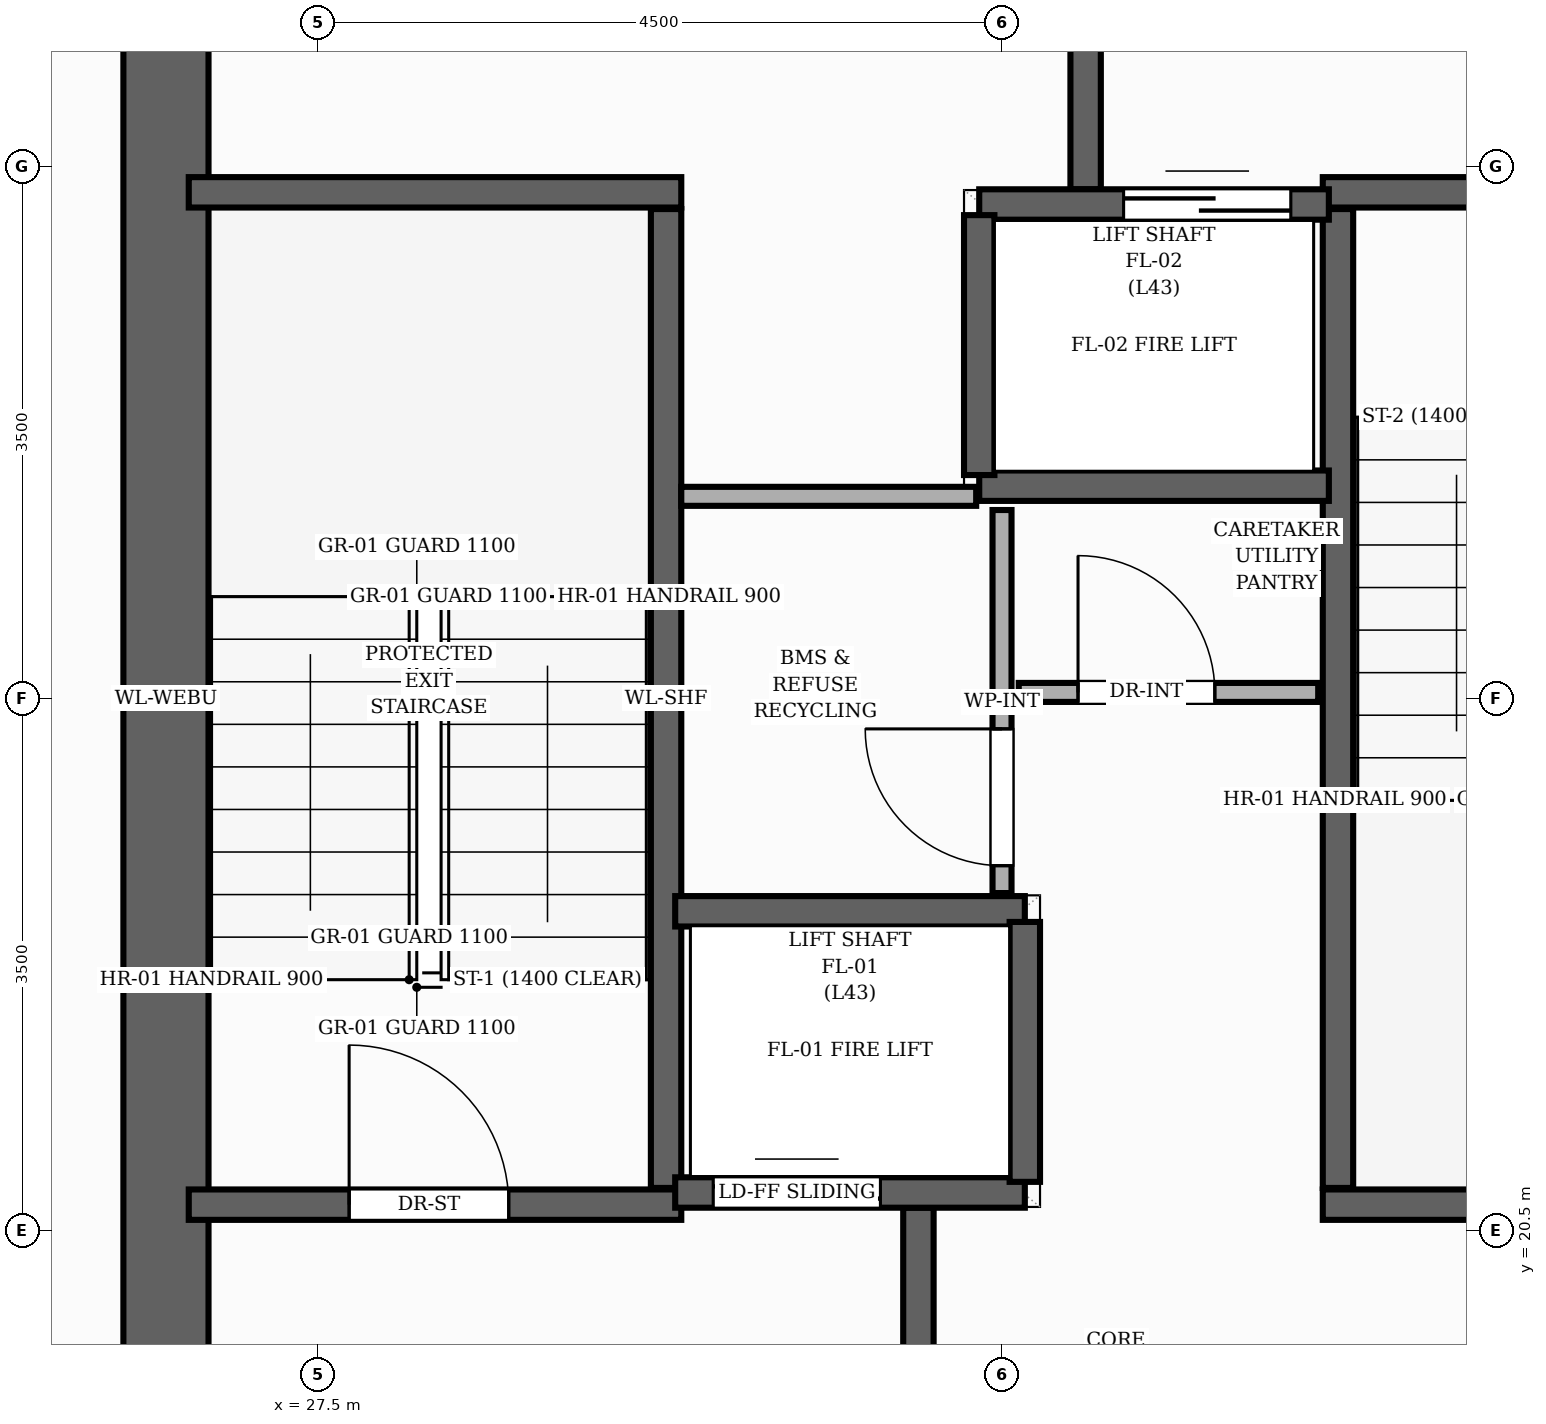
"""IFC4 building model, lengths in metres.
Left out: names, types, materials, properties, quantities, classifications, styles, units other than length and angle.
Written with IfcOpenShell. Run it as: python <this file> out.ifc"""

import sys

from ifc_helpers import new_model, si_unit, direction, frame, frame_2d, origin, place, context, subcontext, project, spatial, rectangle, extrude, element, fill, save


model = new_model("IFC4")
c1 = context("Model", 3, precision=1e-05, world=origin(), true_north=direction((0.0, 1.0)))
c2 = subcontext(c1, "Body", "Model", "MODEL_VIEW")
j1 = project(units=[si_unit("LENGTHUNIT", "METRE"), si_unit("PLANEANGLEUNIT", "RADIAN")], contexts=[c1])
p1 = place(None, origin())
s1 = spatial("IfcSite", under=j1, at=p1, CompositionType="ELEMENT")
p2 = place(p1, origin())
s2 = spatial("IfcBuilding", under=s1, at=p2, CompositionType="ELEMENT")
p3 = place(p2, frame((0.0, 0.0, 142.56)))
s3 = spatial("IfcBuildingStorey", under=s2, at=p3, CompositionType="ELEMENT", Elevation=142.56)
p4 = place(p3, frame((26.5, 17.3, 0.0), z_axis=(0.0, 0.0, 1.0), x_axis=(0.0, 1.0, 0.0)))
e1 = element("IfcWall", 1, at=p4, inside=s3, PredefinedType="SHEAR", context=c2, shape_type="SweptSolid", body=[
    extrude(rectangle(XDim=13.4, YDim=0.56, at=frame_2d((6.7, 0.0))), origin(), (0.0, 0.0, 1.0), 3.2),
])
p5 = place(p3, frame((29.79, 20.78, 0.0), z_axis=(0.0, 0.0, 1.0), x_axis=(0.0, 1.0, 0.0)))
e2 = element("IfcWall", 2, at=p5, inside=s3, PredefinedType="SHEAR", context=c2, shape_type="SweptSolid", body=[
    extrude(rectangle(XDim=6.44, YDim=0.2, at=frame_2d((3.22, 0.0))), origin(), (0.0, 0.0, 1.0), 3.2),
])
p6 = place(p3, frame((26.65, 27.33, 0.0), z_axis=(0.0, 0.0, 1.0), x_axis=(1.0, 0.0, 0.0)))
e3 = element("IfcWall", 3, at=p6, inside=s3, PredefinedType="SHEAR", context=c2, shape_type="SweptSolid", body=[
    extrude(rectangle(XDim=3.24, YDim=0.2, at=frame_2d((1.62, 0.0))), origin(), (0.0, 0.0, 1.0), 3.2),
])
p7 = place(p3, frame((26.65, 20.67, 0.0), z_axis=(0.0, 0.0, 1.0), x_axis=(1.0, 0.0, 0.0)))
e4 = element("IfcWall", 4, at=p7, inside=s3, PredefinedType="SHEAR", context=c2, shape_type="SweptSolid", body=[
    extrude(rectangle(XDim=3.24, YDim=0.2, at=frame_2d((1.62, 0.0))), origin(), (0.0, 0.0, 1.0), 3.2),
])
p8 = place(p7, frame((1.055, 0.0, 0.0)))
e5 = element("IfcOpeningElement", 5, at=p8, cuts=e4, PredefinedType="OPENING", context=c2, shape_type="SweptSolid", body=[
    extrude(rectangle(XDim=1.05, YDim=2.15, at=frame_2d((0.525, 1.075))), frame((0.0, 0.11, 0.0), z_axis=(0.0, -1.0, 0.0), x_axis=(1.0, 0.0, 0.0)), (0.0, 0.0, 1.0), 0.22),
])
p9 = place(p3, frame((34.21, 20.78, 0.0), z_axis=(0.0, 0.0, 1.0), x_axis=(0.0, 1.0, 0.0)))
e6 = element("IfcWall", 6, at=p9, inside=s3, PredefinedType="SHEAR", context=c2, shape_type="SweptSolid", body=[
    extrude(rectangle(XDim=6.44, YDim=0.2, at=frame_2d((3.22, 0.0))), origin(), (0.0, 0.0, 1.0), 3.2),
])
p10 = place(p3, frame((34.11, 20.67, 0.0), z_axis=(0.0, 0.0, 1.0), x_axis=(1.0, 0.0, 0.0)))
e7 = element("IfcWall", 7, at=p10, inside=s3, PredefinedType="SHEAR", context=c2, shape_type="SweptSolid", body=[
    extrude(rectangle(XDim=3.24, YDim=0.2, at=frame_2d((1.62, 0.0))), origin(), (0.0, 0.0, 1.0), 3.2),
])
p11 = place(p3, frame((34.11, 27.33, 0.0), z_axis=(0.0, 0.0, 1.0), x_axis=(1.0, 0.0, 0.0)))
e8 = element("IfcWall", 8, at=p11, inside=s3, PredefinedType="SHEAR", context=c2, shape_type="SweptSolid", body=[
    extrude(rectangle(XDim=3.24, YDim=0.2, at=frame_2d((1.62, 0.0))), origin(), (0.0, 0.0, 1.0), 3.2),
])
p12 = place(p11, frame((1.135, 0.0, 0.0)))
e9 = element("IfcOpeningElement", 9, at=p12, cuts=e8, PredefinedType="OPENING", context=c2, shape_type="SweptSolid", body=[
    extrude(rectangle(XDim=1.05, YDim=2.15, at=frame_2d((0.525, 1.075))), frame((0.0, 0.11, 0.0), z_axis=(0.0, -1.0, 0.0), x_axis=(1.0, 0.0, 0.0)), (0.0, 0.0, 1.0), 0.22),
])
for number, where, z_axis, x_axis in (
    (10, (31.45, 17.15, 0.0), (0.0, 0.0, 1.0), (0.0, 1.0, 0.0)),
    (11, (32.55, 27.35, 0.0), (0.0, 0.0, 1.0), (0.0, 1.0, 0.0)),
):
    element("IfcWall", number, at=place(p3, frame(where, z_axis=z_axis, x_axis=x_axis)), inside=s3, PredefinedType="SHEAR", context=c2, shape_type="SweptSolid", body=[
        extrude(rectangle(XDim=3.5, YDim=0.2, at=frame_2d((1.75, 0.0))), origin(), (0.0, 0.0, 1.0), 3.2),
    ])
p13 = place(p3, frame((29.85, 20.75, 0.0), z_axis=(0.0, 0.0, 1.0), x_axis=(1.0, 0.0, 0.0)))
e12 = element("IfcWall", 12, at=p13, inside=s3, PredefinedType="SHEAR", context=c2, shape_type="SweptSolid", body=[
    extrude(rectangle(XDim=2.3, YDim=0.2, at=frame_2d((1.15, 0.0))), origin(), (0.0, 0.0, 1.0), 3.2),
])
p14 = place(p13, frame((0.25, 0.0, 0.0)))
e13 = element("IfcOpeningElement", 13, at=p14, cuts=e12, PredefinedType="OPENING", context=c2, shape_type="SweptSolid", body=[
    extrude(rectangle(XDim=1.1, YDim=2.15, at=frame_2d((0.55, 1.075))), frame((0.0, 0.11, 0.0), z_axis=(0.0, -1.0, 0.0), x_axis=(1.0, 0.0, 0.0)), (0.0, 0.0, 1.0), 0.22),
])
p15 = place(p3, frame((29.85, 22.6, 0.0), z_axis=(0.0, 0.0, 1.0), x_axis=(1.0, 0.0, 0.0)))
e14 = element("IfcWall", 14, at=p15, inside=s3, PredefinedType="SHEAR", context=c2, shape_type="SweptSolid", body=[
    extrude(rectangle(XDim=2.3, YDim=0.2, at=frame_2d((1.15, 0.0))), origin(), (0.0, 0.0, 1.0), 3.2),
])
p16 = place(p3, frame((32.15, 20.82, 0.0), z_axis=(0.0, 0.0, 1.0), x_axis=(0.0, 1.0, 0.0)))
e15 = element("IfcWall", 15, at=p16, inside=s3, PredefinedType="SHEAR", context=c2, shape_type="SweptSolid", body=[
    extrude(rectangle(XDim=1.71, YDim=0.2, at=frame_2d((0.855, 0.0))), origin(), (0.0, 0.0, 1.0), 3.2),
])
p17 = place(p3, frame((31.85, 27.25, 0.0), z_axis=(0.0, 0.0, 1.0), x_axis=(1.0, 0.0, 0.0)))
e16 = element("IfcWall", 16, at=p17, inside=s3, PredefinedType="SHEAR", context=c2, shape_type="SweptSolid", body=[
    extrude(rectangle(XDim=2.3, YDim=0.2, at=frame_2d((1.15, 0.0))), origin(), (0.0, 0.0, 1.0), 3.2),
])
p18 = place(p17, frame((0.95, 0.0, 0.0)))
e17 = element("IfcOpeningElement", 17, at=p18, cuts=e16, PredefinedType="OPENING", context=c2, shape_type="SweptSolid", body=[
    extrude(rectangle(XDim=1.1, YDim=2.15, at=frame_2d((0.55, 1.075))), frame((0.0, 0.11, 0.0), z_axis=(0.0, -1.0, 0.0), x_axis=(1.0, 0.0, 0.0)), (0.0, 0.0, 1.0), 0.22),
])
p19 = place(p3, frame((31.85, 25.4, 0.0), z_axis=(0.0, 0.0, 1.0), x_axis=(1.0, 0.0, 0.0)))
e18 = element("IfcWall", 18, at=p19, inside=s3, PredefinedType="SHEAR", context=c2, shape_type="SweptSolid", body=[
    extrude(rectangle(XDim=2.3, YDim=0.2, at=frame_2d((1.15, 0.0))), origin(), (0.0, 0.0, 1.0), 3.2),
])
p20 = place(p3, frame((31.85, 25.47, 0.0), z_axis=(0.0, 0.0, 1.0), x_axis=(0.0, 1.0, 0.0)))
e19 = element("IfcWall", 19, at=p20, inside=s3, PredefinedType="SHEAR", context=c2, shape_type="SweptSolid", body=[
    extrude(rectangle(XDim=1.71, YDim=0.2, at=frame_2d((0.855, 0.0))), origin(), (0.0, 0.0, 1.0), 3.2),
])
p21 = place(p3, frame((32.0, 22.72, 0.0), z_axis=(0.0, 0.0, 1.0), x_axis=(0.0, 1.0, 0.0)))
e20 = element("IfcWall", 20, at=p21, inside=s3, PredefinedType="PARTITIONING", context=c2, shape_type="SweptSolid", body=[
    extrude(rectangle(XDim=2.52, YDim=0.125, at=frame_2d((1.26, 0.0))), origin(), (0.0, 0.0, 1.0), 2.955),
])
p22 = place(p21, frame((0.18, 0.0, 0.0)))
e21 = element("IfcOpeningElement", 21, at=p22, cuts=e20, PredefinedType="OPENING", context=c2, shape_type="SweptSolid", body=[
    extrude(rectangle(XDim=0.9, YDim=2.1, at=frame_2d((0.45, 1.05))), frame((0.0, 0.073, 0.0), z_axis=(0.0, -1.0, 0.0), x_axis=(1.0, 0.0, 0.0)), (0.0, 0.0, 1.0), 0.145),
])
p23 = place(p3, frame((32.11, 24.04, 0.0), z_axis=(0.0, 0.0, 1.0), x_axis=(1.0, 0.0, 0.0)))
e22 = element("IfcWall", 22, at=p23, inside=s3, PredefinedType="PARTITIONING", context=c2, shape_type="SweptSolid", body=[
    extrude(rectangle(XDim=1.97, YDim=0.125, at=frame_2d((0.985, 0.0))), origin(), (0.0, 0.0, 1.0), 2.955),
])
p24 = place(p23, frame((0.39, 0.0, 0.0)))
e23 = element("IfcOpeningElement", 23, at=p24, cuts=e22, PredefinedType="OPENING", context=c2, shape_type="SweptSolid", body=[
    extrude(rectangle(XDim=0.9, YDim=2.1, at=frame_2d((0.45, 1.05))), frame((0.0, 0.073, 0.0), z_axis=(0.0, -1.0, 0.0), x_axis=(1.0, 0.0, 0.0)), (0.0, 0.0, 1.0), 0.145),
])
p25 = place(p3, frame((29.89, 25.33, 0.0), z_axis=(0.0, 0.0, 1.0), x_axis=(1.0, 0.0, 0.0)))
e24 = element("IfcWall", 24, at=p25, inside=s3, PredefinedType="PARTITIONING", context=c2, shape_type="SweptSolid", body=[
    extrude(rectangle(XDim=1.94, YDim=0.125, at=frame_2d((0.97, 0.0))), origin(), (0.0, 0.0, 1.0), 2.955),
])
p26 = place(p8, origin())
e25 = element("IfcDoor", 25, at=p26, inside=s3, OperationType="SINGLE_SWING_LEFT", PredefinedType="DOOR", context=c2, shape_type="SweptSolid", body=[
    extrude(rectangle(XDim=1.05, YDim=2.15, at=frame_2d((0.525, 1.075))), frame((0.0, 0.025, 0.0), z_axis=(0.0, -1.0, 0.0), x_axis=(1.0, 0.0, 0.0)), (0.0, 0.0, 1.0), 0.05),
])
fill(e5, e25)
p27 = place(p14, origin())
e26 = element("IfcDoor", 26, at=p27, inside=s3, OperationType="DOUBLE_DOOR_SLIDING", PredefinedType="DOOR", context=c2, shape_type="SweptSolid", body=[
    extrude(rectangle(XDim=1.1, YDim=2.15, at=frame_2d((0.55, 1.075))), frame((0.0, 0.025, 0.0), z_axis=(0.0, -1.0, 0.0), x_axis=(1.0, 0.0, 0.0)), (0.0, 0.0, 1.0), 0.05),
])
fill(e13, e26)
p28 = place(p18, origin())
e27 = element("IfcDoor", 27, at=p28, inside=s3, OperationType="DOUBLE_DOOR_SLIDING", PredefinedType="DOOR", context=c2, shape_type="SweptSolid", body=[
    extrude(rectangle(XDim=1.1, YDim=2.15, at=frame_2d((0.55, 1.075))), frame((0.0, 0.025, 0.0), z_axis=(0.0, -1.0, 0.0), x_axis=(1.0, 0.0, 0.0)), (0.0, 0.0, 1.0), 0.05),
])
fill(e17, e27)
p29 = place(p24, origin())
e28 = element("IfcDoor", 28, at=p29, inside=s3, OperationType="SINGLE_SWING_LEFT", PredefinedType="DOOR", context=c2, shape_type="SweptSolid", body=[
    extrude(rectangle(XDim=0.9, YDim=2.1, at=frame_2d((0.45, 1.05))), frame((0.0, 0.025, 0.0), z_axis=(0.0, -1.0, 0.0), x_axis=(1.0, 0.0, 0.0)), (0.0, 0.0, 1.0), 0.05),
])
fill(e23, e28)
p30 = place(p22, origin())
e29 = element("IfcDoor", 29, at=p30, inside=s3, OperationType="SINGLE_SWING_RIGHT", PredefinedType="DOOR", context=c2, shape_type="SweptSolid", body=[
    extrude(rectangle(XDim=0.9, YDim=2.1, at=frame_2d((0.45, 1.05))), frame((0.0, 0.025, 0.0), z_axis=(0.0, -1.0, 0.0), x_axis=(1.0, 0.0, 0.0)), (0.0, 0.0, 1.0), 0.05),
])
fill(e21, e29)
save(model, sys.argv[1])
